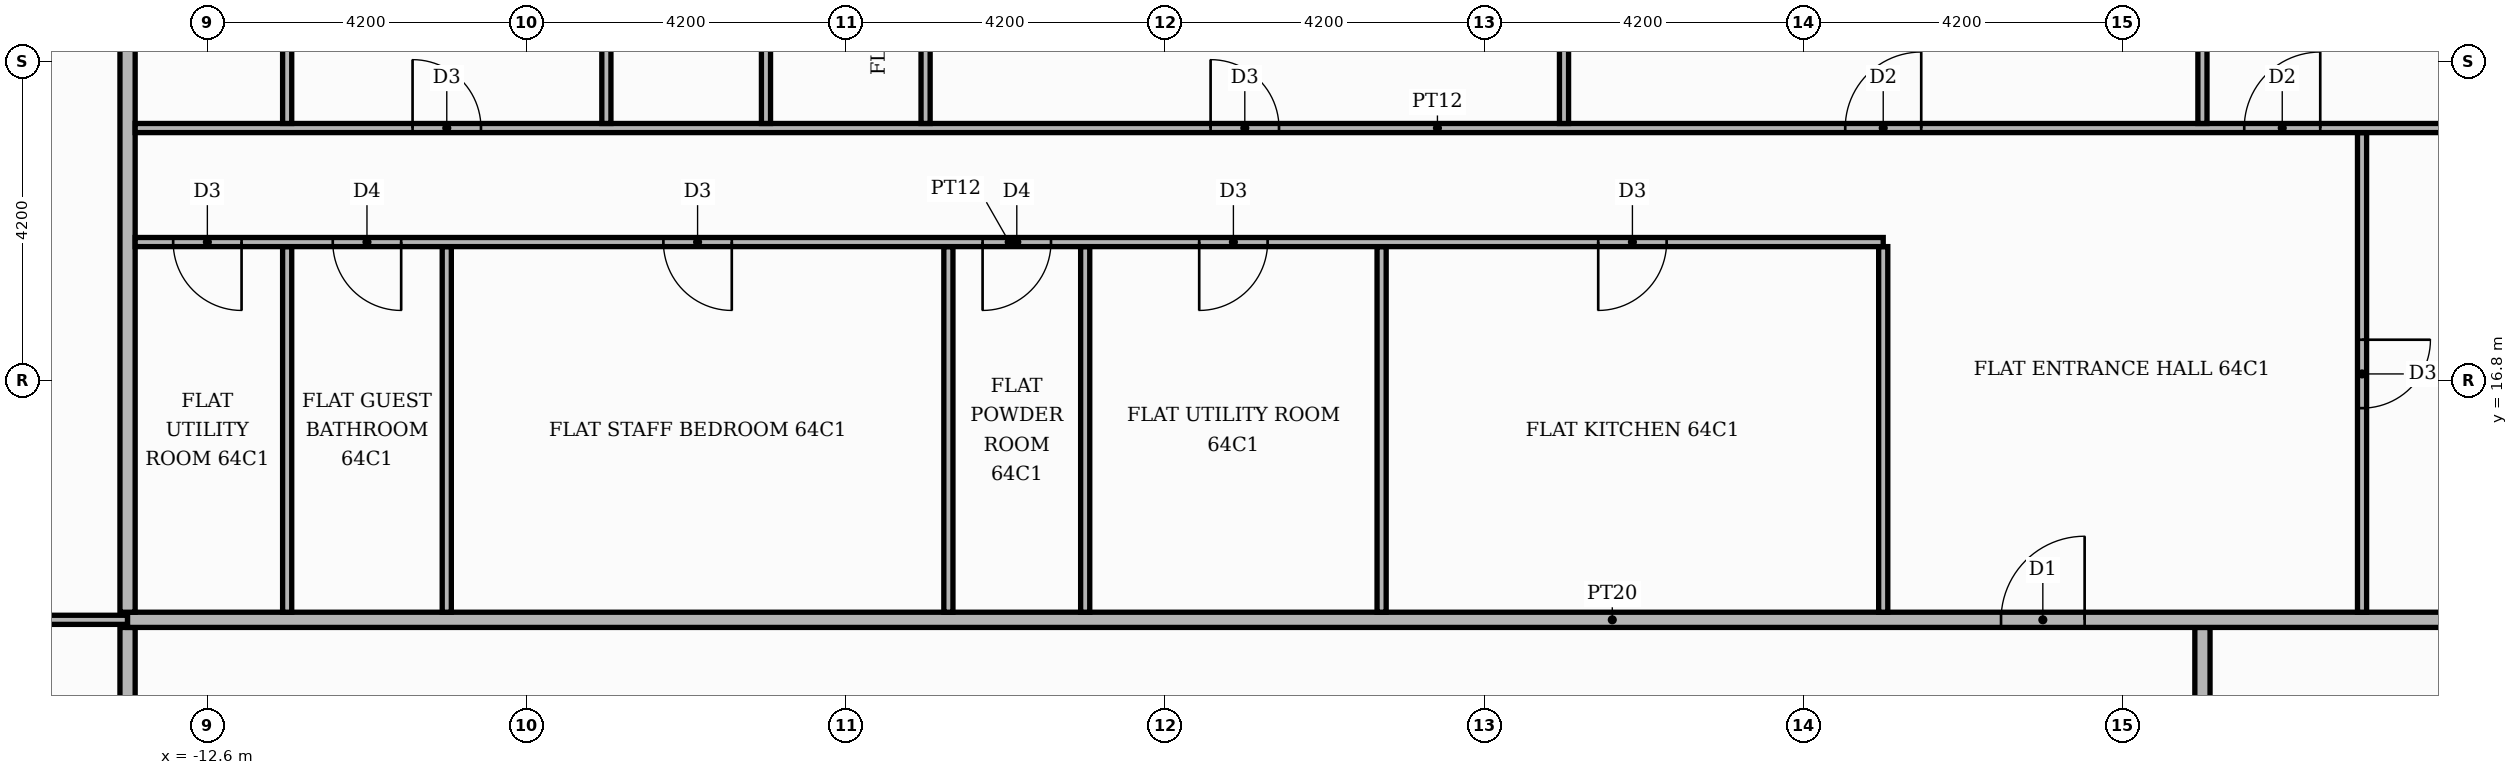
"""IFC4 building model, lengths in metres.
Left out: names, types, materials, properties, quantities, classifications, styles, units other than length and angle.
Written with IfcOpenShell. Run it as: python <this file> out.ifc"""

import sys

from ifc_helpers import new_model, si_unit, direction, frame, frame_2d, origin, place, context, subcontext, project, spatial, rectangle, extrude, element, fill, save


model = new_model("IFC4")
c1 = context("Model", 3, precision=1e-05, world=origin(), true_north=direction((0.0, 1.0)))
c2 = subcontext(c1, "Body", "Model", "MODEL_VIEW")
j1 = project(units=[si_unit("LENGTHUNIT", "METRE"), si_unit("PLANEANGLEUNIT", "RADIAN")], contexts=[c1])
p1 = place(None, origin())
s1 = spatial("IfcSite", under=j1, at=p1, CompositionType="ELEMENT")
p2 = place(p1, origin())
s2 = spatial("IfcBuilding", under=s1, at=p2, CompositionType="ELEMENT")
p3 = place(p2, frame((0.0, 0.0, 267.9)))
s3 = spatial("IfcBuildingStorey", under=s2, at=p3, CompositionType="ELEMENT", Elevation=267.9)
for number, where, z_axis, x_axis in (
    (1, (-13.65, 11.1, 0.0), (0.0, 0.0, 1.0), (0.0, 1.0, 0.0)),
    (2, (13.65, 11.1, 0.0), (0.0, 0.0, 1.0), (0.0, 1.0, 0.0)),
):
    element("IfcWall", number, at=place(p3, frame(where, z_axis=z_axis, x_axis=x_axis)), inside=s3, PredefinedType="PARTITIONING", context=c2, shape_type="SweptSolid", body=[
        extrude(rectangle(XDim=2.45, YDim=0.2, at=frame_2d((1.225, 0.0))), origin(), (0.0, 0.0, 1.0), 3.48),
    ])
p4 = place(p3, frame((-20.42, 13.65, 0.0), z_axis=(0.0, 0.0, 1.0), x_axis=(1.0, 0.0, 0.0)))
e3 = element("IfcWall", 3, at=p4, inside=s3, PredefinedType="PARTITIONING", context=c2, shape_type="SweptSolid", body=[
    extrude(rectangle(XDim=6.77, YDim=0.12, at=frame_2d((3.385, 0.0))), origin(), (0.0, 0.0, 1.0), 3.48),
])
p5 = place(p4, frame((2.885, 0.0, 0.0)))
e4 = element("IfcOpeningElement", 4, at=p5, cuts=e3, PredefinedType="OPENING", context=c2, shape_type="SweptSolid", body=[
    extrude(rectangle(XDim=1.0, YDim=2.1, at=frame_2d((0.5, 1.05))), frame((0.0, 0.07, 0.0), z_axis=(0.0, -1.0, 0.0), x_axis=(1.0, 0.0, 0.0)), (0.0, 0.0, 1.0), 0.14),
])
p6 = place(p3, frame((-13.65, 13.65, 0.0), z_axis=(0.0, 0.0, 1.0), x_axis=(1.0, 0.0, 0.0)))
e5 = element("IfcWall", 5, at=p6, inside=s3, PredefinedType="PARTITIONING", context=c2, shape_type="SweptSolid", body=[
    extrude(rectangle(XDim=39.07, YDim=0.2, at=frame_2d((19.535, 0.0))), origin(), (0.0, 0.0, 1.0), 3.48),
])
p7 = place(p6, frame((24.65, 0.0, 0.0)))
e6 = element("IfcOpeningElement", 6, at=p7, cuts=e5, PredefinedType="OPENING", context=c2, shape_type="SweptSolid", body=[
    extrude(rectangle(XDim=1.1, YDim=2.4, at=frame_2d((0.55, 1.2))), frame((0.0, 0.11, 0.0), z_axis=(0.0, -1.0, 0.0), x_axis=(1.0, 0.0, 0.0)), (0.0, 0.0, 1.0), 0.22),
])
p8 = place(p3, frame((-13.65, 13.75, 0.0), z_axis=(0.0, 0.0, 1.0), x_axis=(0.0, 1.0, 0.0)))
e7 = element("IfcWall", 7, at=p8, inside=s3, PredefinedType="PARTITIONING", context=c2, shape_type="SweptSolid", body=[
    extrude(rectangle(XDim=11.67, YDim=0.2, at=frame_2d((5.835, 0.0))), origin(), (0.0, 0.0, 1.0), 3.48),
])
for number, where, z_axis, x_axis in (
    (8, (-11.55, 13.75, 0.0), (0.0, 0.0, 1.0), (0.0, 1.0, 0.0)),
    (9, (-9.45, 13.75, 0.0), (0.0, 0.0, 1.0), (0.0, 1.0, 0.0)),
    (10, (-2.85, 13.75, 0.0), (0.0, 0.0, 1.0), (0.0, 1.0, 0.0)),
    (11, (-1.05, 13.75, 0.0), (0.0, 0.0, 1.0), (0.0, 1.0, 0.0)),
    (12, (2.85, 13.75, 0.0), (0.0, 0.0, 1.0), (0.0, 1.0, 0.0)),
    (13, (9.45, 13.75, 0.0), (0.0, 0.0, 1.0), (0.0, 1.0, 0.0)),
):
    element("IfcWall", number, at=place(p3, frame(where, z_axis=z_axis, x_axis=x_axis)), inside=s3, PredefinedType="PARTITIONING", context=c2, shape_type="SweptSolid", body=[
        extrude(rectangle(XDim=4.81, YDim=0.12, at=frame_2d((2.405, 0.0))), origin(), (0.0, 0.0, 1.0), 3.48),
    ])
p9 = place(p3, frame((15.75, 13.75, 0.0), z_axis=(0.0, 0.0, 1.0), x_axis=(0.0, 1.0, 0.0)))
e14 = element("IfcWall", 14, at=p9, inside=s3, PredefinedType="PARTITIONING", context=c2, shape_type="SweptSolid", body=[
    extrude(rectangle(XDim=6.31, YDim=0.12, at=frame_2d((3.155, 0.0))), origin(), (0.0, 0.0, 1.0), 3.48),
])
p10 = place(p9, frame((2.685, 0.0, 0.0)))
e15 = element("IfcOpeningElement", 15, at=p10, cuts=e14, PredefinedType="OPENING", context=c2, shape_type="SweptSolid", body=[
    extrude(rectangle(XDim=0.9, YDim=2.1, at=frame_2d((0.45, 1.05))), frame((0.0, 0.07, 0.0), z_axis=(0.0, -1.0, 0.0), x_axis=(1.0, 0.0, 0.0)), (0.0, 0.0, 1.0), 0.14),
])
p11 = place(p3, frame((-13.55, 18.62, 0.0), z_axis=(0.0, 0.0, 1.0), x_axis=(1.0, 0.0, 0.0)))
e16 = element("IfcWall", 16, at=p11, inside=s3, PredefinedType="PARTITIONING", context=c2, shape_type="SweptSolid", body=[
    extrude(rectangle(XDim=23.0, YDim=0.12, at=frame_2d((11.5, 0.0))), origin(), (0.0, 0.0, 1.0), 3.48),
])
p12 = place(p11, frame((19.25, 0.0, 0.0)))
e17 = element("IfcOpeningElement", 17, at=p12, cuts=e16, PredefinedType="OPENING", context=c2, shape_type="SweptSolid", body=[
    extrude(rectangle(XDim=0.9, YDim=2.1, at=frame_2d((0.45, 1.05))), frame((0.0, 0.07, 0.0), z_axis=(0.0, -1.0, 0.0), x_axis=(1.0, 0.0, 0.0)), (0.0, 0.0, 1.0), 0.14),
])
p13 = place(p11, frame((14.0, 0.0, 0.0)))
e18 = element("IfcOpeningElement", 18, at=p13, cuts=e16, PredefinedType="OPENING", context=c2, shape_type="SweptSolid", body=[
    extrude(rectangle(XDim=0.9, YDim=2.1, at=frame_2d((0.45, 1.05))), frame((0.0, 0.07, 0.0), z_axis=(0.0, -1.0, 0.0), x_axis=(1.0, 0.0, 0.0)), (0.0, 0.0, 1.0), 0.14),
])
p14 = place(p11, frame((11.15, 0.0, 0.0)))
e19 = element("IfcOpeningElement", 19, at=p14, cuts=e16, PredefinedType="OPENING", context=c2, shape_type="SweptSolid", body=[
    extrude(rectangle(XDim=0.9, YDim=2.1, at=frame_2d((0.45, 1.05))), frame((0.0, 0.07, 0.0), z_axis=(0.0, -1.0, 0.0), x_axis=(1.0, 0.0, 0.0)), (0.0, 0.0, 1.0), 0.14),
])
p15 = place(p11, frame((6.95, 0.0, 0.0)))
e20 = element("IfcOpeningElement", 20, at=p15, cuts=e16, PredefinedType="OPENING", context=c2, shape_type="SweptSolid", body=[
    extrude(rectangle(XDim=0.9, YDim=2.1, at=frame_2d((0.45, 1.05))), frame((0.0, 0.07, 0.0), z_axis=(0.0, -1.0, 0.0), x_axis=(1.0, 0.0, 0.0)), (0.0, 0.0, 1.0), 0.14),
])
p16 = place(p11, frame((2.6, 0.0, 0.0)))
e21 = element("IfcOpeningElement", 21, at=p16, cuts=e16, PredefinedType="OPENING", context=c2, shape_type="SweptSolid", body=[
    extrude(rectangle(XDim=0.9, YDim=2.1, at=frame_2d((0.45, 1.05))), frame((0.0, 0.07, 0.0), z_axis=(0.0, -1.0, 0.0), x_axis=(1.0, 0.0, 0.0)), (0.0, 0.0, 1.0), 0.14),
])
p17 = place(p11, frame((0.5, 0.0, 0.0)))
e22 = element("IfcOpeningElement", 22, at=p17, cuts=e16, PredefinedType="OPENING", context=c2, shape_type="SweptSolid", body=[
    extrude(rectangle(XDim=0.9, YDim=2.1, at=frame_2d((0.45, 1.05))), frame((0.0, 0.07, 0.0), z_axis=(0.0, -1.0, 0.0), x_axis=(1.0, 0.0, 0.0)), (0.0, 0.0, 1.0), 0.14),
])
p18 = place(p3, frame((-13.55, 20.12, 0.0), z_axis=(0.0, 0.0, 1.0), x_axis=(1.0, 0.0, 0.0)))
e23 = element("IfcWall", 23, at=p18, inside=s3, PredefinedType="PARTITIONING", context=c2, shape_type="SweptSolid", body=[
    extrude(rectangle(XDim=34.269, YDim=0.12, at=frame_2d((17.135, 0.0))), origin(), (0.0, 0.0, 1.0), 3.48),
])
p19 = place(p18, frame((27.75, 0.0, 0.0)))
e24 = element("IfcOpeningElement", 24, at=p19, cuts=e23, PredefinedType="OPENING", context=c2, shape_type="SweptSolid", body=[
    extrude(rectangle(XDim=1.0, YDim=2.1, at=frame_2d((0.5, 1.05))), frame((0.0, 0.07, 0.0), z_axis=(0.0, -1.0, 0.0), x_axis=(1.0, 0.0, 0.0)), (0.0, 0.0, 1.0), 0.14),
])
p20 = place(p18, frame((22.5, 0.0, 0.0)))
e25 = element("IfcOpeningElement", 25, at=p20, cuts=e23, PredefinedType="OPENING", context=c2, shape_type="SweptSolid", body=[
    extrude(rectangle(XDim=1.0, YDim=2.1, at=frame_2d((0.5, 1.05))), frame((0.0, 0.07, 0.0), z_axis=(0.0, -1.0, 0.0), x_axis=(1.0, 0.0, 0.0)), (0.0, 0.0, 1.0), 0.14),
])
p21 = place(p18, frame((14.15, 0.0, 0.0)))
e26 = element("IfcOpeningElement", 26, at=p21, cuts=e23, PredefinedType="OPENING", context=c2, shape_type="SweptSolid", body=[
    extrude(rectangle(XDim=0.9, YDim=2.1, at=frame_2d((0.45, 1.05))), frame((0.0, 0.07, 0.0), z_axis=(0.0, -1.0, 0.0), x_axis=(1.0, 0.0, 0.0)), (0.0, 0.0, 1.0), 0.14),
])
p22 = place(p18, frame((3.65, 0.0, 0.0)))
e27 = element("IfcOpeningElement", 27, at=p22, cuts=e23, PredefinedType="OPENING", context=c2, shape_type="SweptSolid", body=[
    extrude(rectangle(XDim=0.9, YDim=2.1, at=frame_2d((0.45, 1.05))), frame((0.0, 0.07, 0.0), z_axis=(0.0, -1.0, 0.0), x_axis=(1.0, 0.0, 0.0)), (0.0, 0.0, 1.0), 0.14),
])
p23 = place(p3, frame((-11.55, 20.18, 0.0), z_axis=(0.0, 0.0, 1.0), x_axis=(0.0, 1.0, 0.0)))
e28 = element("IfcWall", 28, at=p23, inside=s3, PredefinedType="PARTITIONING", context=c2, shape_type="SweptSolid", body=[
    extrude(rectangle(XDim=5.24, YDim=0.12, at=frame_2d((2.62, 0.0))), origin(), (0.0, 0.0, 1.0), 3.48),
])
p24 = place(p23, frame((2.29, 0.0, 0.0)))
e29 = element("IfcOpeningElement", 29, at=p24, cuts=e28, PredefinedType="OPENING", context=c2, shape_type="SweptSolid", body=[
    extrude(rectangle(XDim=0.9, YDim=2.1, at=frame_2d((0.45, 1.05))), frame((0.0, 0.07, 0.0), z_axis=(0.0, -1.0, 0.0), x_axis=(1.0, 0.0, 0.0)), (0.0, 0.0, 1.0), 0.14),
])
p25 = place(p3, frame((-7.35, 20.18, 0.0), z_axis=(0.0, 0.0, 1.0), x_axis=(0.0, 1.0, 0.0)))
e30 = element("IfcWall", 30, at=p25, inside=s3, PredefinedType="PARTITIONING", context=c2, shape_type="SweptSolid", body=[
    extrude(rectangle(XDim=5.24, YDim=0.12, at=frame_2d((2.62, 0.0))), origin(), (0.0, 0.0, 1.0), 3.48),
])
p26 = place(p3, frame((-5.25, 20.18, 0.0), z_axis=(0.0, 0.0, 1.0), x_axis=(0.0, 1.0, 0.0)))
e31 = element("IfcWall", 31, at=p26, inside=s3, PredefinedType="PARTITIONING", context=c2, shape_type="SweptSolid", body=[
    extrude(rectangle(XDim=5.24, YDim=0.12, at=frame_2d((2.62, 0.0))), origin(), (0.0, 0.0, 1.0), 3.48),
])
p27 = place(p26, frame((2.29, 0.0, 0.0)))
e32 = element("IfcOpeningElement", 32, at=p27, cuts=e31, PredefinedType="OPENING", context=c2, shape_type="SweptSolid", body=[
    extrude(rectangle(XDim=0.9, YDim=2.1, at=frame_2d((0.45, 1.05))), frame((0.0, 0.07, 0.0), z_axis=(0.0, -1.0, 0.0), x_axis=(1.0, 0.0, 0.0)), (0.0, 0.0, 1.0), 0.14),
])
p28 = place(p3, frame((-3.15, 20.18, 0.0), z_axis=(0.0, 0.0, 1.0), x_axis=(0.0, 1.0, 0.0)))
e33 = element("IfcWall", 33, at=p28, inside=s3, PredefinedType="PARTITIONING", context=c2, shape_type="SweptSolid", body=[
    extrude(rectangle(XDim=5.24, YDim=0.12, at=frame_2d((2.62, 0.0))), origin(), (0.0, 0.0, 1.0), 3.48),
])
p29 = place(p28, frame((2.29, 0.0, 0.0)))
e34 = element("IfcOpeningElement", 34, at=p29, cuts=e33, PredefinedType="OPENING", context=c2, shape_type="SweptSolid", body=[
    extrude(rectangle(XDim=0.9, YDim=2.1, at=frame_2d((0.45, 1.05))), frame((0.0, 0.07, 0.0), z_axis=(0.0, -1.0, 0.0), x_axis=(1.0, 0.0, 0.0)), (0.0, 0.0, 1.0), 0.14),
])
for number, where, z_axis, x_axis in (
    (35, (5.25, 20.18, 0.0), (0.0, 0.0, 1.0), (0.0, 1.0, 0.0)),
    (36, (13.65, 20.18, 0.0), (0.0, 0.0, 1.0), (0.0, 1.0, 0.0)),
):
    element("IfcWall", number, at=place(p3, frame(where, z_axis=z_axis, x_axis=x_axis)), inside=s3, PredefinedType="PARTITIONING", context=c2, shape_type="SweptSolid", body=[
        extrude(rectangle(XDim=5.24, YDim=0.12, at=frame_2d((2.62, 0.0))), origin(), (0.0, 0.0, 1.0), 3.48),
    ])
p30 = place(p7, origin())
e37 = element("IfcDoor", 37, at=p30, inside=s3, OperationType="SINGLE_SWING_RIGHT", PredefinedType="DOOR", context=c2, shape_type="SweptSolid", body=[
    extrude(rectangle(XDim=1.1, YDim=2.4, at=frame_2d((0.55, 1.2))), frame((0.0, 0.025, 0.0), z_axis=(0.0, -1.0, 0.0), x_axis=(1.0, 0.0, 0.0)), (0.0, 0.0, 1.0), 0.05),
])
fill(e6, e37)
p31 = place(p10, frame((0.9, 0.0, 0.0), z_axis=(0.0, 0.0, 1.0), x_axis=(-1.0, 0.0, 0.0)))
e38 = element("IfcDoor", 38, at=p31, inside=s3, OperationType="SINGLE_SWING_RIGHT", PredefinedType="DOOR", context=c2, shape_type="SweptSolid", body=[
    extrude(rectangle(XDim=0.9, YDim=2.1, at=frame_2d((0.45, 1.05))), frame((0.0, 0.025, 0.0), z_axis=(0.0, -1.0, 0.0), x_axis=(1.0, 0.0, 0.0)), (0.0, 0.0, 1.0), 0.05),
])
fill(e15, e38)
p32 = place(p12, frame((0.9, 0.0, 0.0), z_axis=(0.0, 0.0, 1.0), x_axis=(-1.0, 0.0, 0.0)))
e39 = element("IfcDoor", 39, at=p32, inside=s3, OperationType="SINGLE_SWING_LEFT", PredefinedType="DOOR", context=c2, shape_type="SweptSolid", body=[
    extrude(rectangle(XDim=0.9, YDim=2.1, at=frame_2d((0.45, 1.05))), frame((0.0, 0.025, 0.0), z_axis=(0.0, -1.0, 0.0), x_axis=(1.0, 0.0, 0.0)), (0.0, 0.0, 1.0), 0.05),
])
fill(e17, e39)
p33 = place(p13, frame((0.9, 0.0, 0.0), z_axis=(0.0, 0.0, 1.0), x_axis=(-1.0, 0.0, 0.0)))
e40 = element("IfcDoor", 40, at=p33, inside=s3, OperationType="SINGLE_SWING_LEFT", PredefinedType="DOOR", context=c2, shape_type="SweptSolid", body=[
    extrude(rectangle(XDim=0.9, YDim=2.1, at=frame_2d((0.45, 1.05))), frame((0.0, 0.025, 0.0), z_axis=(0.0, -1.0, 0.0), x_axis=(1.0, 0.0, 0.0)), (0.0, 0.0, 1.0), 0.05),
])
fill(e18, e40)
p34 = place(p14, frame((0.9, 0.0, 0.0), z_axis=(0.0, 0.0, 1.0), x_axis=(-1.0, 0.0, 0.0)))
e41 = element("IfcDoor", 41, at=p34, inside=s3, OperationType="SINGLE_SWING_LEFT", PredefinedType="DOOR", context=c2, shape_type="SweptSolid", body=[
    extrude(rectangle(XDim=0.9, YDim=2.1, at=frame_2d((0.45, 1.05))), frame((0.0, 0.025, 0.0), z_axis=(0.0, -1.0, 0.0), x_axis=(1.0, 0.0, 0.0)), (0.0, 0.0, 1.0), 0.05),
])
fill(e19, e41)
p35 = place(p15, frame((0.9, 0.0, 0.0), z_axis=(0.0, 0.0, 1.0), x_axis=(-1.0, 0.0, 0.0)))
e42 = element("IfcDoor", 42, at=p35, inside=s3, OperationType="SINGLE_SWING_RIGHT", PredefinedType="DOOR", context=c2, shape_type="SweptSolid", body=[
    extrude(rectangle(XDim=0.9, YDim=2.1, at=frame_2d((0.45, 1.05))), frame((0.0, 0.025, 0.0), z_axis=(0.0, -1.0, 0.0), x_axis=(1.0, 0.0, 0.0)), (0.0, 0.0, 1.0), 0.05),
])
fill(e20, e42)
p36 = place(p16, frame((0.9, 0.0, 0.0), z_axis=(0.0, 0.0, 1.0), x_axis=(-1.0, 0.0, 0.0)))
e43 = element("IfcDoor", 43, at=p36, inside=s3, OperationType="SINGLE_SWING_RIGHT", PredefinedType="DOOR", context=c2, shape_type="SweptSolid", body=[
    extrude(rectangle(XDim=0.9, YDim=2.1, at=frame_2d((0.45, 1.05))), frame((0.0, 0.025, 0.0), z_axis=(0.0, -1.0, 0.0), x_axis=(1.0, 0.0, 0.0)), (0.0, 0.0, 1.0), 0.05),
])
fill(e21, e43)
p37 = place(p17, frame((0.9, 0.0, 0.0), z_axis=(0.0, 0.0, 1.0), x_axis=(-1.0, 0.0, 0.0)))
e44 = element("IfcDoor", 44, at=p37, inside=s3, OperationType="SINGLE_SWING_RIGHT", PredefinedType="DOOR", context=c2, shape_type="SweptSolid", body=[
    extrude(rectangle(XDim=0.9, YDim=2.1, at=frame_2d((0.45, 1.05))), frame((0.0, 0.025, 0.0), z_axis=(0.0, -1.0, 0.0), x_axis=(1.0, 0.0, 0.0)), (0.0, 0.0, 1.0), 0.05),
])
fill(e22, e44)
p38 = place(p19, origin())
e45 = element("IfcDoor", 45, at=p38, inside=s3, OperationType="SINGLE_SWING_RIGHT", PredefinedType="DOOR", context=c2, shape_type="SweptSolid", body=[
    extrude(rectangle(XDim=1.0, YDim=2.1, at=frame_2d((0.5, 1.05))), frame((0.0, 0.025, 0.0), z_axis=(0.0, -1.0, 0.0), x_axis=(1.0, 0.0, 0.0)), (0.0, 0.0, 1.0), 0.05),
])
fill(e24, e45)
p39 = place(p20, origin())
e46 = element("IfcDoor", 46, at=p39, inside=s3, OperationType="SINGLE_SWING_RIGHT", PredefinedType="DOOR", context=c2, shape_type="SweptSolid", body=[
    extrude(rectangle(XDim=1.0, YDim=2.1, at=frame_2d((0.5, 1.05))), frame((0.0, 0.025, 0.0), z_axis=(0.0, -1.0, 0.0), x_axis=(1.0, 0.0, 0.0)), (0.0, 0.0, 1.0), 0.05),
])
fill(e25, e46)
p40 = place(p21, origin())
e47 = element("IfcDoor", 47, at=p40, inside=s3, OperationType="SINGLE_SWING_LEFT", PredefinedType="DOOR", context=c2, shape_type="SweptSolid", body=[
    extrude(rectangle(XDim=0.9, YDim=2.1, at=frame_2d((0.45, 1.05))), frame((0.0, 0.025, 0.0), z_axis=(0.0, -1.0, 0.0), x_axis=(1.0, 0.0, 0.0)), (0.0, 0.0, 1.0), 0.05),
])
fill(e26, e47)
p41 = place(p22, origin())
e48 = element("IfcDoor", 48, at=p41, inside=s3, OperationType="SINGLE_SWING_LEFT", PredefinedType="DOOR", context=c2, shape_type="SweptSolid", body=[
    extrude(rectangle(XDim=0.9, YDim=2.1, at=frame_2d((0.45, 1.05))), frame((0.0, 0.025, 0.0), z_axis=(0.0, -1.0, 0.0), x_axis=(1.0, 0.0, 0.0)), (0.0, 0.0, 1.0), 0.05),
])
fill(e27, e48)
save(model, sys.argv[1])
